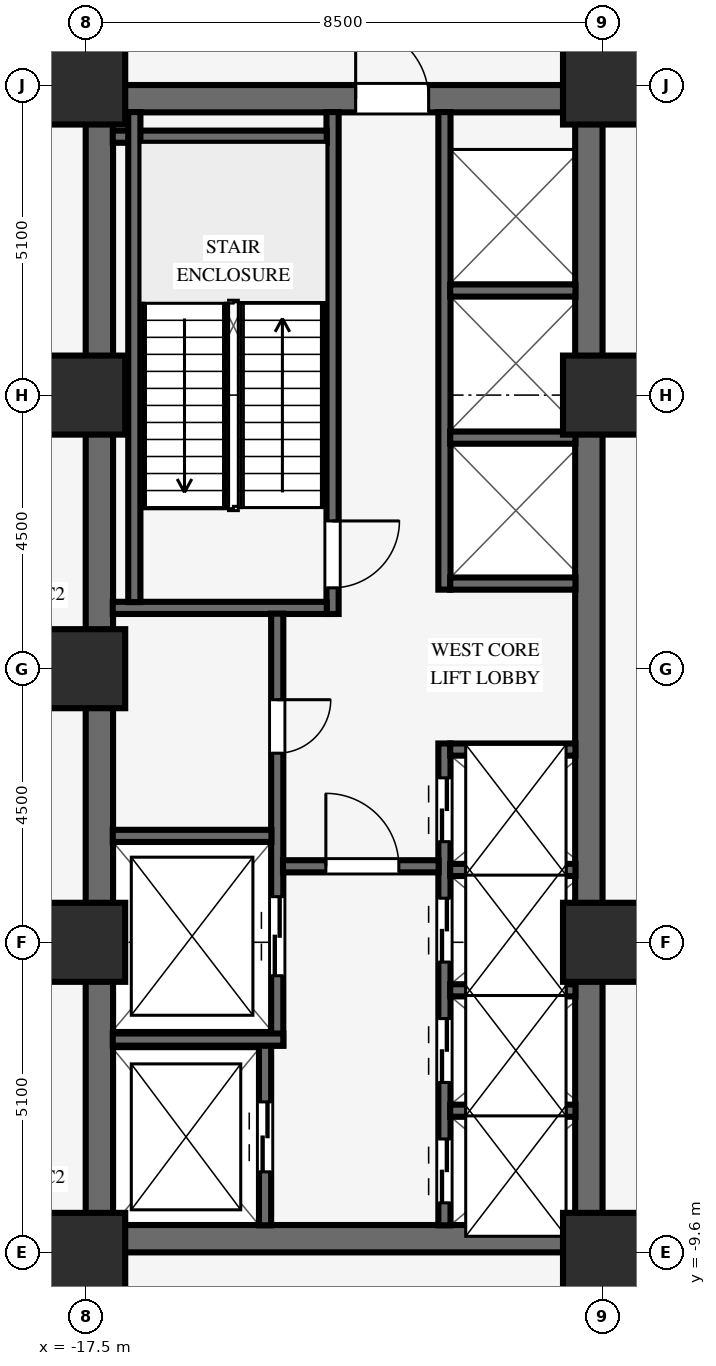
"""IFC4 building model, lengths in metres.
Left out: names, types, materials, properties, quantities, classifications, styles, units other than length and angle.
Written with IfcOpenShell. Run it as: python <this file> out.ifc"""

import sys

from ifc_helpers import new_model, si_unit, direction, frame, frame_2d, origin, origin_2d, place, context, subcontext, project, spatial, rectangle, extrude, source, transform, mapped, element, fill, save


model = new_model("IFC4")
c1 = context("Model", 3, precision=1e-05, world=origin(), true_north=direction((0.0, 1.0)))
c2 = subcontext(c1, "Body", "Model", "MODEL_VIEW")
j1 = project(units=[si_unit("LENGTHUNIT", "METRE"), si_unit("PLANEANGLEUNIT", "RADIAN")], contexts=[c1])
p1 = place(None, origin())
s1 = spatial("IfcSite", under=j1, at=p1, CompositionType="ELEMENT")
p2 = place(p1, origin())
s2 = spatial("IfcBuilding", under=s1, at=p2, CompositionType="ELEMENT")
p3 = place(p2, frame((0.0, 0.0, 4.6)))
s3 = spatial("IfcBuildingStorey", under=s2, at=p3, CompositionType="ELEMENT", Elevation=4.6)
p4 = place(p3, frame((-17.5, -9.375, 0.0), z_axis=(0.0, 0.0, 1.0), x_axis=(1.0, 0.0, 0.0)))
e1 = element("IfcWall", 1, at=p4, inside=s3, PredefinedType="SHEAR", context=c2, shape_type="SweptSolid", body=[
    extrude(rectangle(XDim=8.5, YDim=0.45, at=frame_2d((4.25, 0.0))), origin(), (0.0, 0.0, 1.0), 4.28),
])
p5 = place(p3, frame((-17.5, 9.375, 0.0), z_axis=(0.0, 0.0, 1.0), x_axis=(1.0, 0.0, 0.0)))
e2 = element("IfcWall", 2, at=p5, inside=s3, PredefinedType="SHEAR", context=c2, shape_type="SweptSolid", body=[
    extrude(rectangle(XDim=8.5, YDim=0.45, at=frame_2d((4.25, 0.0))), origin(), (0.0, 0.0, 1.0), 4.28),
])
p6 = place(p5, frame((4.44, 0.0, 0.0)))
e3 = element("IfcOpeningElement", 3, at=p6, cuts=e2, PredefinedType="OPENING", context=c2, shape_type="SweptSolid", body=[
    extrude(rectangle(XDim=1.2, YDim=2.15, at=frame_2d((0.6, 1.075))), frame((0.0, 0.235, 0.0), z_axis=(0.0, -1.0, 0.0), x_axis=(1.0, 0.0, 0.0)), (0.0, 0.0, 1.0), 0.47),
])
for number, where, z_axis, x_axis in (
    (4, (-17.275, -9.155, 0.0), (0.0, 0.0, 1.0), (0.0, 1.0, 0.0)),
    (5, (-9.225, -9.155, 0.0), (0.0, 0.0, 1.0), (0.0, 1.0, 0.0)),
):
    element("IfcWall", number, at=place(p3, frame(where, z_axis=z_axis, x_axis=x_axis)), inside=s3, PredefinedType="SHEAR", context=c2, shape_type="SweptSolid", body=[
        extrude(rectangle(XDim=18.31, YDim=0.45, at=frame_2d((9.155, 0.0))), origin(), (0.0, 0.0, 1.0), 4.28),
    ])
for number, where, z_axis, x_axis in (
    (6, (-17.5, -9.6, 0.0), (0.0, 0.0, 1.0), (1.0, 0.0, 0.0)),
    (7, (-17.5, -4.5, 0.0), (0.0, 0.0, 1.0), (1.0, 0.0, 0.0)),
    (8, (-17.5, 4.5, 0.0), (0.0, 0.0, 1.0), (1.0, 0.0, 0.0)),
    (9, (-17.5, 9.6, 0.0), (0.0, 0.0, 1.0), (1.0, 0.0, 0.0)),
    (10, (-9.0, -9.6, 0.0), (0.0, 0.0, 1.0), (1.0, 0.0, 0.0)),
    (11, (-9.0, -4.5, 0.0), (0.0, 0.0, 1.0), (1.0, 0.0, 0.0)),
    (12, (-9.0, 4.5, 0.0), (0.0, 0.0, 1.0), (1.0, 0.0, 0.0)),
    (13, (-9.0, 9.6, 0.0), (0.0, 0.0, 1.0), (1.0, 0.0, 0.0)),
    (14, (-17.5, 0.0, 0.0), (0.0, 0.0, 1.0), (1.0, 0.0, 0.0)),
):
    element("IfcColumn", number, at=place(p3, frame(where, z_axis=z_axis, x_axis=x_axis)), inside=s3, PredefinedType="COLUMN", context=c2, shape_type="SweptSolid", body=[
        extrude(rectangle(XDim=1.3, YDim=1.3, at=origin_2d()), origin(), (0.0, 0.0, 1.0), 4.28),
    ])
p7 = place(p3, frame((-13.44, 0.9, 0.0), z_axis=(0.0, 0.0, 1.0), x_axis=(0.0, 1.0, 0.0)))
e15 = element("IfcWall", 15, at=p7, inside=s3, PredefinedType="SHEAR", context=c2, shape_type="SweptSolid", body=[
    extrude(rectangle(XDim=8.255, YDim=0.2, at=frame_2d((4.127, 0.0))), origin(), (0.0, 0.0, 1.0), 4.28),
])
p8 = place(p7, frame((1.53, 0.0, 0.0), z_axis=(0.0, 0.0, 1.0), x_axis=(-1.0, 0.0, 0.0)))
e16 = element("IfcOpeningElement", 16, at=p8, cuts=e15, PredefinedType="OPENING", context=c2, shape_type="SweptSolid", body=[
    extrude(rectangle(XDim=1.1, YDim=2.15, at=frame_2d((0.55, 1.075))), frame((0.0, 0.11, 0.0), z_axis=(0.0, -1.0, 0.0), x_axis=(1.0, 0.0, 0.0)), (0.0, 0.0, 1.0), 0.22),
])
for number, where, z_axis, x_axis in (
    (17, (-17.055, 1.0, 0.0), (0.0, 0.0, 1.0), (1.0, 0.0, 0.0)),
    (18, (-17.055, 8.75, 0.0), (0.0, 0.0, 1.0), (1.0, 0.0, 0.0)),
):
    element("IfcWall", number, at=place(p3, frame(where, z_axis=z_axis, x_axis=x_axis)), inside=s3, PredefinedType="SHEAR", context=c2, shape_type="SweptSolid", body=[
        extrude(rectangle(XDim=3.52, YDim=0.2, at=frame_2d((1.76, 0.0))), origin(), (0.0, 0.0, 1.0), 4.28),
    ])
p9 = place(p3, frame((-16.7, 1.095, 0.0), z_axis=(0.0, 0.0, 1.0), x_axis=(0.0, 1.0, 0.0)))
e19 = element("IfcWall", 19, at=p9, inside=s3, PredefinedType="SHEAR", context=c2, shape_type="SweptSolid", body=[
    extrude(rectangle(XDim=8.06, YDim=0.2, at=frame_2d((4.03, 0.0))), origin(), (0.0, 0.0, 1.0), 4.28),
])
p10 = place(p3, frame((-14.55, -9.155, 0.0), z_axis=(0.0, 0.0, 1.0), x_axis=(0.0, 1.0, 0.0)))
e20 = element("IfcWall", 20, at=p10, inside=s3, PredefinedType="SHEAR", context=c2, shape_type="SweptSolid", body=[
    extrude(rectangle(XDim=2.96, YDim=0.2, at=frame_2d((1.48, 0.0))), origin(), (0.0, 0.0, 1.0), 4.28),
])
p11 = place(p10, frame((0.88, 0.0, 0.0)))
e21 = element("IfcOpeningElement", 21, at=p11, cuts=e20, PredefinedType="OPENING", context=c2, shape_type="SweptSolid", body=[
    extrude(rectangle(XDim=1.15, YDim=2.15, at=frame_2d((0.575, 1.075))), frame((0.0, 0.11, 0.0), z_axis=(0.0, -1.0, 0.0), x_axis=(1.0, 0.0, 0.0)), (0.0, 0.0, 1.0), 0.22),
])
p12 = place(p3, frame((-14.35, -6.2, 0.0), z_axis=(0.0, 0.0, 1.0), x_axis=(0.0, 1.0, 0.0)))
e22 = element("IfcWall", 22, at=p12, inside=s3, PredefinedType="SHEAR", context=c2, shape_type="SweptSolid", body=[
    extrude(rectangle(XDim=7.105, YDim=0.2, at=frame_2d((3.552, 0.0))), origin(), (0.0, 0.0, 1.0), 4.28),
])
p13 = place(p12, frame((5.69, 0.0, 0.0), z_axis=(0.0, 0.0, 1.0), x_axis=(-1.0, 0.0, 0.0)))
e23 = element("IfcOpeningElement", 23, at=p13, cuts=e22, PredefinedType="OPENING", context=c2, shape_type="SweptSolid", body=[
    extrude(rectangle(XDim=0.88, YDim=2.1, at=frame_2d((0.44, 1.05))), frame((0.0, 0.11, 0.0), z_axis=(0.0, -1.0, 0.0), x_axis=(1.0, 0.0, 0.0)), (0.0, 0.0, 1.0), 0.22),
])
p14 = place(p12, frame((1.15, 0.0, 0.0)))
e24 = element("IfcOpeningElement", 24, at=p14, cuts=e22, PredefinedType="OPENING", context=c2, shape_type="SweptSolid", body=[
    extrude(rectangle(XDim=1.3, YDim=2.2, at=frame_2d((0.65, 1.1))), frame((0.0, 0.11, 0.0), z_axis=(0.0, -1.0, 0.0), x_axis=(1.0, 0.0, 0.0)), (0.0, 0.0, 1.0), 0.22),
])
p15 = place(p3, frame((-17.055, -6.1, 0.0), z_axis=(0.0, 0.0, 1.0), x_axis=(1.0, 0.0, 0.0)))
e25 = element("IfcWall", 25, at=p15, inside=s3, PredefinedType="SHEAR", context=c2, shape_type="SweptSolid", body=[
    extrude(rectangle(XDim=2.805, YDim=0.2, at=frame_2d((1.402, 0.0))), origin(), (0.0, 0.0, 1.0), 4.28),
])
p16 = place(p3, frame((-17.055, -2.75, 0.0), z_axis=(0.0, 0.0, 1.0), x_axis=(1.0, 0.0, 0.0)))
e26 = element("IfcWall", 26, at=p16, inside=s3, PredefinedType="SHEAR", context=c2, shape_type="SweptSolid", body=[
    extrude(rectangle(XDim=2.61, YDim=0.2, at=frame_2d((1.305, 0.0))), origin(), (0.0, 0.0, 1.0), 4.28),
])
p17 = place(p3, frame((-11.6, -9.155, 0.0), z_axis=(0.0, 0.0, 1.0), x_axis=(0.0, 1.0, 0.0)))
e27 = element("IfcWall", 27, at=p17, inside=s3, PredefinedType="SHEAR", context=c2, shape_type="SweptSolid", body=[
    extrude(rectangle(XDim=7.925, YDim=0.2, at=frame_2d((3.962, 0.0))), origin(), (0.0, 0.0, 1.0), 4.28),
])
p18 = place(p17, frame((0.37, 0.0, 0.0)))
e28 = element("IfcOpeningElement", 28, at=p18, cuts=e27, PredefinedType="OPENING", context=c2, shape_type="SweptSolid", body=[
    extrude(rectangle(XDim=1.05, YDim=2.15, at=frame_2d((0.525, 1.075))), frame((0.0, 0.11, 0.0), z_axis=(0.0, -1.0, 0.0), x_axis=(1.0, 0.0, 0.0)), (0.0, 0.0, 1.0), 0.22),
])
p19 = place(p17, frame((2.35, 0.0, 0.0)))
e29 = element("IfcOpeningElement", 29, at=p19, cuts=e27, PredefinedType="OPENING", context=c2, shape_type="SweptSolid", body=[
    extrude(rectangle(XDim=1.05, YDim=2.15, at=frame_2d((0.525, 1.075))), frame((0.0, 0.11, 0.0), z_axis=(0.0, -1.0, 0.0), x_axis=(1.0, 0.0, 0.0)), (0.0, 0.0, 1.0), 0.22),
])
p20 = place(p17, frame((4.33, 0.0, 0.0)))
e30 = element("IfcOpeningElement", 30, at=p20, cuts=e27, PredefinedType="OPENING", context=c2, shape_type="SweptSolid", body=[
    extrude(rectangle(XDim=1.05, YDim=2.15, at=frame_2d((0.525, 1.075))), frame((0.0, 0.11, 0.0), z_axis=(0.0, -1.0, 0.0), x_axis=(1.0, 0.0, 0.0)), (0.0, 0.0, 1.0), 0.22),
])
p21 = place(p17, frame((6.31, 0.0, 0.0)))
e31 = element("IfcOpeningElement", 31, at=p21, cuts=e27, PredefinedType="OPENING", context=c2, shape_type="SweptSolid", body=[
    extrude(rectangle(XDim=1.05, YDim=2.15, at=frame_2d((0.525, 1.075))), frame((0.0, 0.11, 0.0), z_axis=(0.0, -1.0, 0.0), x_axis=(1.0, 0.0, 0.0)), (0.0, 0.0, 1.0), 0.22),
])
p22 = place(p3, frame((-14.255, -3.25, 0.0), z_axis=(0.0, 0.0, 1.0), x_axis=(1.0, 0.0, 0.0)))
e32 = element("IfcWall", 32, at=p22, inside=s3, PredefinedType="SHEAR", context=c2, shape_type="SweptSolid", body=[
    extrude(rectangle(XDim=2.56, YDim=0.2, at=frame_2d((1.28, 0.0))), origin(), (0.0, 0.0, 1.0), 4.28),
])
p23 = place(p22, frame((0.705, 0.0, 0.0)))
e33 = element("IfcOpeningElement", 33, at=p23, cuts=e32, PredefinedType="OPENING", context=c2, shape_type="SweptSolid", body=[
    extrude(rectangle(XDim=1.2, YDim=2.15, at=frame_2d((0.6, 1.075))), frame((0.0, 0.11, 0.0), z_axis=(0.0, -1.0, 0.0), x_axis=(1.0, 0.0, 0.0)), (0.0, 0.0, 1.0), 0.22),
])
for number, where, z_axis, x_axis in (
    (34, (-11.505, -7.27, 0.0), (0.0, 0.0, 1.0), (1.0, 0.0, 0.0)),
    (35, (-11.505, -5.29, 0.0), (0.0, 0.0, 1.0), (1.0, 0.0, 0.0)),
    (36, (-11.505, -3.31, 0.0), (0.0, 0.0, 1.0), (1.0, 0.0, 0.0)),
    (37, (-11.505, -1.33, 0.0), (0.0, 0.0, 1.0), (1.0, 0.0, 0.0)),
):
    element("IfcWall", number, at=place(p3, frame(where, z_axis=z_axis, x_axis=x_axis)), inside=s3, PredefinedType="SHEAR", context=c2, shape_type="SweptSolid", body=[
        extrude(rectangle(XDim=2.06, YDim=0.2, at=frame_2d((1.03, 0.0))), origin(), (0.0, 0.0, 1.0), 4.28),
    ])
p24 = place(p3, frame((-11.6, 1.3, 0.0), z_axis=(0.0, 0.0, 1.0), x_axis=(0.0, 1.0, 0.0)))
e38 = element("IfcWall", 38, at=p24, inside=s3, PredefinedType="SHEAR", context=c2, shape_type="SweptSolid", body=[
    extrude(rectangle(XDim=7.855, YDim=0.2, at=frame_2d((3.927, 0.0))), origin(), (0.0, 0.0, 1.0), 4.28),
])
for number, where, z_axis, x_axis in (
    (39, (-11.505, 1.4, 0.0), (0.0, 0.0, 1.0), (1.0, 0.0, 0.0)),
    (40, (-11.505, 3.8, 0.0), (0.0, 0.0, 1.0), (1.0, 0.0, 0.0)),
    (41, (-11.505, 6.22, 0.0), (0.0, 0.0, 1.0), (1.0, 0.0, 0.0)),
):
    element("IfcWall", number, at=place(p3, frame(where, z_axis=z_axis, x_axis=x_axis)), inside=s3, PredefinedType="SHEAR", context=c2, shape_type="SweptSolid", body=[
        extrude(rectangle(XDim=2.06, YDim=0.2, at=frame_2d((1.03, 0.0))), origin(), (0.0, 0.0, 1.0), 4.28),
    ])
m1 = source(origin(), c2, "Body", "SweptSolid", [
    extrude(rectangle(XDim=1.1, YDim=2.15, at=frame_2d((0.55, 1.075))), frame((0.0, 0.025, 0.0), z_axis=(0.0, -1.0, 0.0), x_axis=(1.0, 0.0, 0.0)), (0.0, 0.0, 1.0), 0.05),
])
p25 = place(p8, origin())
e42 = element("IfcDoor", 42, at=p25, inside=s3, OperationType="SINGLE_SWING_LEFT", PredefinedType="DOOR", context=c2, shape_type="MappedRepresentation", body=[
    mapped(m1, transform((0.0, 0.0, 0.0), scale=1.0)),
])
fill(e16, e42)
m2 = source(origin(), c2, "Body", "SweptSolid", [
    extrude(rectangle(XDim=0.88, YDim=2.1, at=frame_2d((0.44, 1.05))), frame((0.0, 0.025, 0.0), z_axis=(0.0, -1.0, 0.0), x_axis=(1.0, 0.0, 0.0)), (0.0, 0.0, 1.0), 0.05),
])
p26 = place(p13, origin())
e43 = element("IfcDoor", 43, at=p26, inside=s3, OperationType="SINGLE_SWING_LEFT", PredefinedType="DOOR", context=c2, shape_type="MappedRepresentation", body=[
    mapped(m2, transform((0.0, 0.0, 0.0), scale=1.0)),
])
fill(e23, e43)
m3 = source(origin(), c2, "Body", "SweptSolid", [
    extrude(rectangle(XDim=1.2, YDim=2.15, at=frame_2d((0.6, 1.075))), frame((0.0, 0.025, 0.0), z_axis=(0.0, -1.0, 0.0), x_axis=(1.0, 0.0, 0.0)), (0.0, 0.0, 1.0), 0.05),
])
p27 = place(p23, origin())
e44 = element("IfcDoor", 44, at=p27, inside=s3, OperationType="SINGLE_SWING_LEFT", PredefinedType="DOOR", context=c2, shape_type="MappedRepresentation", body=[
    mapped(m3, transform((0.0, 0.0, 0.0), scale=1.0)),
])
fill(e33, e44)
p28 = place(p6, origin())
e45 = element("IfcDoor", 45, at=p28, inside=s3, OperationType="SINGLE_SWING_LEFT", PredefinedType="DOOR", context=c2, shape_type="MappedRepresentation", body=[
    mapped(m3, transform((0.0, 0.0, 0.0), scale=1.0)),
])
fill(e3, e45)
m4 = source(origin(), c2, "Body", "SweptSolid", [
    extrude(rectangle(XDim=1.15, YDim=2.15, at=frame_2d((0.575, 1.075))), frame((0.0, 0.025, 0.0), z_axis=(0.0, -1.0, 0.0), x_axis=(1.0, 0.0, 0.0)), (0.0, 0.0, 1.0), 0.05),
])
p29 = place(p11, origin())
e46 = element("IfcDoor", 46, at=p29, inside=s3, OperationType="DOUBLE_DOOR_SLIDING", PredefinedType="DOOR", context=c2, shape_type="MappedRepresentation", body=[
    mapped(m4, transform((0.0, 0.0, 0.0), scale=1.0)),
])
fill(e21, e46)
m5 = source(origin(), c2, "Body", "SweptSolid", [
    extrude(rectangle(XDim=1.3, YDim=2.2, at=frame_2d((0.65, 1.1))), frame((0.0, 0.025, 0.0), z_axis=(0.0, -1.0, 0.0), x_axis=(1.0, 0.0, 0.0)), (0.0, 0.0, 1.0), 0.05),
])
p30 = place(p14, origin())
e47 = element("IfcDoor", 47, at=p30, inside=s3, OperationType="DOUBLE_DOOR_SLIDING", PredefinedType="DOOR", context=c2, shape_type="MappedRepresentation", body=[
    mapped(m5, transform((0.0, 0.0, 0.0), scale=1.0)),
])
fill(e24, e47)
m6 = source(origin(), c2, "Body", "SweptSolid", [
    extrude(rectangle(XDim=1.05, YDim=2.15, at=frame_2d((0.525, 1.075))), frame((0.0, 0.025, 0.0), z_axis=(0.0, -1.0, 0.0), x_axis=(1.0, 0.0, 0.0)), (0.0, 0.0, 1.0), 0.05),
])
p31 = place(p18, origin())
e48 = element("IfcDoor", 48, at=p31, inside=s3, OperationType="DOUBLE_DOOR_SLIDING", PredefinedType="DOOR", context=c2, shape_type="MappedRepresentation", body=[
    mapped(m6, transform((0.0, 0.0, 0.0), scale=1.0)),
])
fill(e28, e48)
p32 = place(p19, origin())
e49 = element("IfcDoor", 49, at=p32, inside=s3, OperationType="DOUBLE_DOOR_SLIDING", PredefinedType="DOOR", context=c2, shape_type="MappedRepresentation", body=[
    mapped(m6, transform((0.0, 0.0, 0.0), scale=1.0)),
])
fill(e29, e49)
p33 = place(p20, origin())
e50 = element("IfcDoor", 50, at=p33, inside=s3, OperationType="DOUBLE_DOOR_SLIDING", PredefinedType="DOOR", context=c2, shape_type="MappedRepresentation", body=[
    mapped(m6, transform((0.0, 0.0, 0.0), scale=1.0)),
])
fill(e30, e50)
p34 = place(p21, origin())
e51 = element("IfcDoor", 51, at=p34, inside=s3, OperationType="DOUBLE_DOOR_SLIDING", PredefinedType="DOOR", context=c2, shape_type="MappedRepresentation", body=[
    mapped(m6, transform((0.0, 0.0, 0.0), scale=1.0)),
])
fill(e31, e51)
save(model, sys.argv[1])
